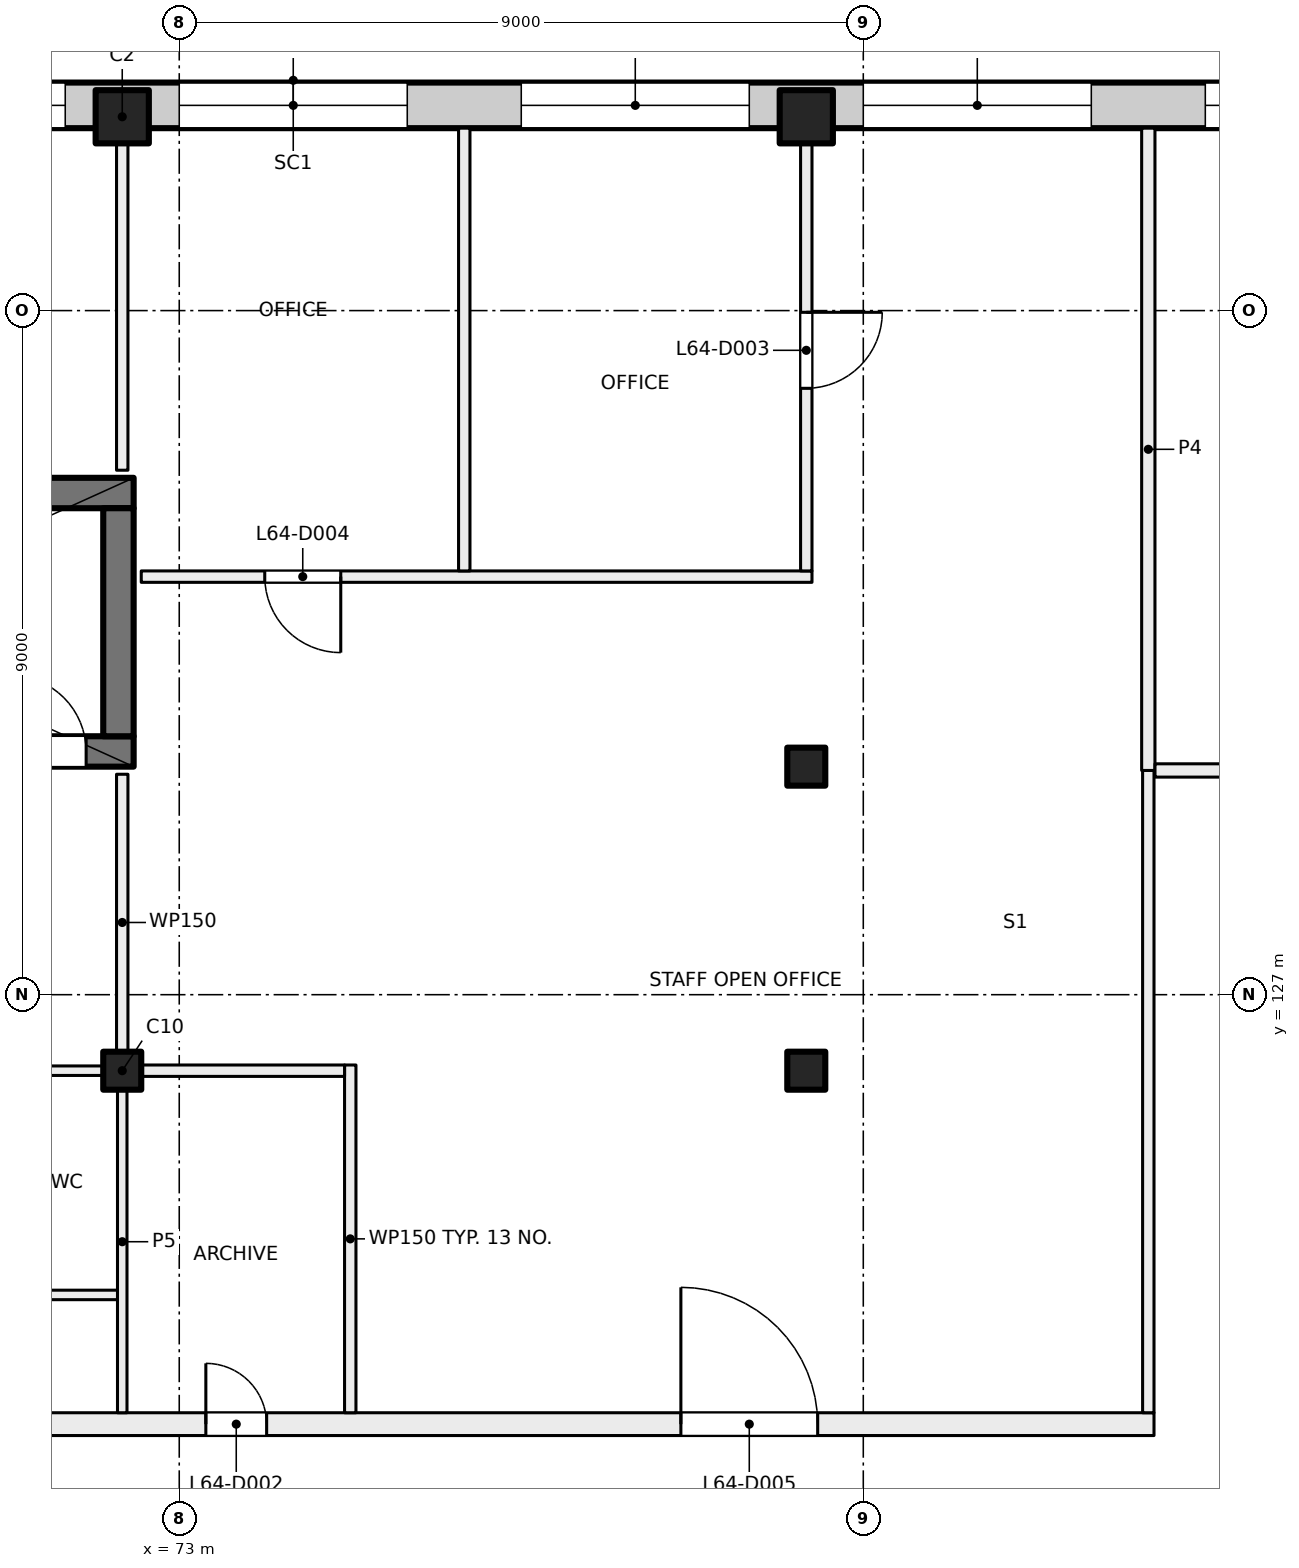
"""IFC4 building model, lengths in metres.
Left out: names, types, materials, properties, quantities, classifications, styles, units other than length and angle.
Written with IfcOpenShell. Run it as: python <this file> out.ifc"""

import sys

from ifc_helpers import new_model, si_unit, direction, frame, frame_2d, origin, origin_2d, place, context, subcontext, project, spatial, rectangle, extrude, element, fill, save


model = new_model("IFC4")
c1 = context("Model", 3, precision=1e-05, world=origin(), true_north=direction((0.0, 1.0)))
c2 = subcontext(c1, "Body", "Model", "MODEL_VIEW")
j1 = project(units=[si_unit("LENGTHUNIT", "METRE"), si_unit("PLANEANGLEUNIT", "RADIAN")], contexts=[c1])
p1 = place(None, origin())
s1 = spatial("IfcSite", under=j1, at=p1, CompositionType="ELEMENT")
p2 = place(p1, origin())
s2 = spatial("IfcBuilding", under=s1, at=p2, CompositionType="ELEMENT")
p3 = place(p2, frame((0.0, 0.0, 269.5)))
s3 = spatial("IfcBuildingStorey", under=s2, at=p3, CompositionType="ELEMENT", Elevation=269.5)
for number, where, z_axis, x_axis in (
    (1, (81.25, 130.0, 0.0), (0.0, 0.0, 1.0), (1.0, 0.0, 0.0)),
    (2, (72.25, 126.0, 0.0), (0.0, 0.0, 1.0), (1.0, 0.0, 0.0)),
    (3, (81.25, 126.0, 0.0), (0.0, 0.0, 1.0), (1.0, 0.0, 0.0)),
):
    element("IfcColumn", number, at=place(p3, frame(where, z_axis=z_axis, x_axis=x_axis)), inside=s3, PredefinedType="COLUMN", context=c2, shape_type="SweptSolid", body=[
        extrude(rectangle(XDim=0.5, YDim=0.5, at=origin_2d()), origin(), (0.0, 0.0, 1.0), 4.0),
    ])
for number, where, z_axis, x_axis in (
    (4, (72.25, 138.55, 0.0), (0.0, 0.0, 1.0), (1.0, 0.0, 0.0)),
    (5, (81.25, 138.55, 0.0), (0.0, 0.0, 1.0), (1.0, 0.0, 0.0)),
):
    element("IfcColumn", number, at=place(p3, frame(where, z_axis=z_axis, x_axis=x_axis)), inside=s3, PredefinedType="COLUMN", context=c2, shape_type="SweptSolid", body=[
        extrude(rectangle(XDim=0.7, YDim=0.7, at=origin_2d()), origin(), (0.0, 0.0, 1.0), 4.0),
    ])
p4 = place(p3, frame((63.5, 130.2, 0.0), z_axis=(0.0, 0.0, 1.0), x_axis=(1.0, 0.0, 0.0)))
e6 = element("IfcWall", 6, at=p4, inside=s3, PredefinedType="SHEAR", context=c2, shape_type="SweptSolid", body=[
    extrude(rectangle(XDim=8.9, YDim=0.4, at=frame_2d((4.45, 0.0))), origin(), (0.0, 0.0, 1.0), 4.0),
])
p5 = place(p4, frame((7.275, 0.0, 0.0)))
e7 = element("IfcOpeningElement", 7, at=p5, cuts=e6, PredefinedType="OPENING", context=c2, shape_type="SweptSolid", body=[
    extrude(rectangle(XDim=1.0, YDim=2.1, at=frame_2d((0.5, 1.05))), frame((0.0, 0.21, 0.0), z_axis=(0.0, -1.0, 0.0), x_axis=(1.0, 0.0, 0.0)), (0.0, 0.0, 1.0), 0.42),
])
p6 = place(p3, frame((64.0, 133.6, 0.0), z_axis=(0.0, 0.0, 1.0), x_axis=(1.0, 0.0, 0.0)))
e8 = element("IfcWall", 8, at=p6, inside=s3, PredefinedType="SHEAR", context=c2, shape_type="SweptSolid", body=[
    extrude(rectangle(XDim=8.4, YDim=0.4, at=frame_2d((4.2, 0.0))), origin(), (0.0, 0.0, 1.0), 4.0),
])
p7 = place(p3, frame((72.2, 130.4, 0.0), z_axis=(0.0, 0.0, 1.0), x_axis=(0.0, 1.0, 0.0)))
e9 = element("IfcWall", 9, at=p7, inside=s3, PredefinedType="SHEAR", context=c2, shape_type="SweptSolid", body=[
    extrude(rectangle(XDim=3.0, YDim=0.4, at=frame_2d((1.5, 0.0))), origin(), (0.0, 0.0, 1.0), 4.0),
])
p8 = place(p3, frame((47.07, 138.7, 0.0), z_axis=(0.0, 0.0, 1.0), x_axis=(1.0, 0.0, 0.0)))
e10 = element("IfcWall", 10, at=p8, inside=s3, PredefinedType="SOLIDWALL", context=c2, shape_type="SweptSolid", body=[
    extrude(rectangle(XDim=43.91, YDim=0.6, at=frame_2d((21.955, 0.0))), origin(), (0.0, 0.0, 1.0), 3.625),
])
p9 = place(p8, frame((3.43, 0.0, 0.9)))
e11 = element("IfcOpeningElement", 11, at=p9, cuts=e10, PredefinedType="OPENING", context=c2, shape_type="SweptSolid", body=[
    extrude(rectangle(XDim=3.0, YDim=2.4, at=frame_2d((1.5, 1.2))), frame((0.0, 0.31, 0.0), z_axis=(0.0, -1.0, 0.0), x_axis=(1.0, 0.0, 0.0)), (0.0, 0.0, 1.0), 0.62),
])
p10 = place(p8, frame((7.93, 0.0, 0.9)))
e12 = element("IfcOpeningElement", 12, at=p10, cuts=e10, PredefinedType="OPENING", context=c2, shape_type="SweptSolid", body=[
    extrude(rectangle(XDim=3.0, YDim=2.4, at=frame_2d((1.5, 1.2))), frame((0.0, 0.31, 0.0), z_axis=(0.0, -1.0, 0.0), x_axis=(1.0, 0.0, 0.0)), (0.0, 0.0, 1.0), 0.62),
])
p11 = place(p8, frame((12.43, 0.0, 0.9)))
e13 = element("IfcOpeningElement", 13, at=p11, cuts=e10, PredefinedType="OPENING", context=c2, shape_type="SweptSolid", body=[
    extrude(rectangle(XDim=3.0, YDim=2.4, at=frame_2d((1.5, 1.2))), frame((0.0, 0.31, 0.0), z_axis=(0.0, -1.0, 0.0), x_axis=(1.0, 0.0, 0.0)), (0.0, 0.0, 1.0), 0.62),
])
p12 = place(p8, frame((16.93, 0.0, 0.9)))
e14 = element("IfcOpeningElement", 14, at=p12, cuts=e10, PredefinedType="OPENING", context=c2, shape_type="SweptSolid", body=[
    extrude(rectangle(XDim=3.0, YDim=2.4, at=frame_2d((1.5, 1.2))), frame((0.0, 0.31, 0.0), z_axis=(0.0, -1.0, 0.0), x_axis=(1.0, 0.0, 0.0)), (0.0, 0.0, 1.0), 0.62),
])
p13 = place(p8, frame((21.43, 0.0, 0.9)))
e15 = element("IfcOpeningElement", 15, at=p13, cuts=e10, PredefinedType="OPENING", context=c2, shape_type="SweptSolid", body=[
    extrude(rectangle(XDim=3.0, YDim=2.4, at=frame_2d((1.5, 1.2))), frame((0.0, 0.31, 0.0), z_axis=(0.0, -1.0, 0.0), x_axis=(1.0, 0.0, 0.0)), (0.0, 0.0, 1.0), 0.62),
])
p14 = place(p8, frame((25.93, 0.0, 0.9)))
e16 = element("IfcOpeningElement", 16, at=p14, cuts=e10, PredefinedType="OPENING", context=c2, shape_type="SweptSolid", body=[
    extrude(rectangle(XDim=3.0, YDim=2.4, at=frame_2d((1.5, 1.2))), frame((0.0, 0.31, 0.0), z_axis=(0.0, -1.0, 0.0), x_axis=(1.0, 0.0, 0.0)), (0.0, 0.0, 1.0), 0.62),
])
p15 = place(p8, frame((30.43, 0.0, 0.9)))
e17 = element("IfcOpeningElement", 17, at=p15, cuts=e10, PredefinedType="OPENING", context=c2, shape_type="SweptSolid", body=[
    extrude(rectangle(XDim=3.0, YDim=2.4, at=frame_2d((1.5, 1.2))), frame((0.0, 0.31, 0.0), z_axis=(0.0, -1.0, 0.0), x_axis=(1.0, 0.0, 0.0)), (0.0, 0.0, 1.0), 0.62),
])
p16 = place(p8, frame((34.93, 0.0, 0.9)))
e18 = element("IfcOpeningElement", 18, at=p16, cuts=e10, PredefinedType="OPENING", context=c2, shape_type="SweptSolid", body=[
    extrude(rectangle(XDim=3.0, YDim=2.4, at=frame_2d((1.5, 1.2))), frame((0.0, 0.31, 0.0), z_axis=(0.0, -1.0, 0.0), x_axis=(1.0, 0.0, 0.0)), (0.0, 0.0, 1.0), 0.62),
])
p17 = place(p8, frame((39.43, 0.0, 0.9)))
e19 = element("IfcOpeningElement", 19, at=p17, cuts=e10, PredefinedType="OPENING", context=c2, shape_type="SweptSolid", body=[
    extrude(rectangle(XDim=3.0, YDim=2.4, at=frame_2d((1.5, 1.2))), frame((0.0, 0.31, 0.0), z_axis=(0.0, -1.0, 0.0), x_axis=(1.0, 0.0, 0.0)), (0.0, 0.0, 1.0), 0.62),
])
p18 = place(p3, frame((54.4, 121.35, 0.0), z_axis=(0.0, 0.0, 1.0), x_axis=(1.0, 0.0, 0.0)))
e20 = element("IfcWall", 20, at=p18, inside=s3, PredefinedType="PARTITIONING", context=c2, shape_type="SweptSolid", body=[
    extrude(rectangle(XDim=31.425, YDim=0.3, at=frame_2d((15.712, 0.0))), origin(), (0.0, 0.0, 1.0), 3.625),
])
p19 = place(p18, frame((18.95, 0.0, 0.0)))
e21 = element("IfcOpeningElement", 21, at=p19, cuts=e20, PredefinedType="OPENING", context=c2, shape_type="SweptSolid", body=[
    extrude(rectangle(XDim=0.8, YDim=2.1, at=frame_2d((0.4, 1.05))), frame((0.0, 0.16, 0.0), z_axis=(0.0, -1.0, 0.0), x_axis=(1.0, 0.0, 0.0)), (0.0, 0.0, 1.0), 0.32),
])
p20 = place(p18, frame((25.2, 0.0, 0.0)))
e22 = element("IfcOpeningElement", 22, at=p20, cuts=e20, PredefinedType="OPENING", context=c2, shape_type="SweptSolid", body=[
    extrude(rectangle(XDim=1.8, YDim=2.1, at=frame_2d((0.9, 1.05))), frame((0.0, 0.16, 0.0), z_axis=(0.0, -1.0, 0.0), x_axis=(1.0, 0.0, 0.0)), (0.0, 0.0, 1.0), 0.32),
])
p21 = place(p18, frame((12.85, 0.0, 0.0)))
e23 = element("IfcOpeningElement", 23, at=p21, cuts=e20, PredefinedType="OPENING", context=c2, shape_type="SweptSolid", body=[
    extrude(rectangle(XDim=1.0, YDim=2.1, at=frame_2d((0.5, 1.05))), frame((0.0, 0.16, 0.0), z_axis=(0.0, -1.0, 0.0), x_axis=(1.0, 0.0, 0.0)), (0.0, 0.0, 1.0), 0.32),
])
p22 = place(p18, frame((3.515, 0.0, 0.0)))
e24 = element("IfcOpeningElement", 24, at=p22, cuts=e20, PredefinedType="OPENING", context=c2, shape_type="SweptSolid", body=[
    extrude(rectangle(XDim=1.8, YDim=2.1, at=frame_2d((0.9, 1.05))), frame((0.0, 0.16, 0.0), z_axis=(0.0, -1.0, 0.0), x_axis=(1.0, 0.0, 0.0)), (0.0, 0.0, 1.0), 0.32),
])
p23 = place(p3, frame((63.312, 123.05, 0.0), z_axis=(0.0, 0.0, 1.0), x_axis=(1.0, 0.0, 0.0)))
e25 = element("IfcWall", 25, at=p23, inside=s3, PredefinedType="PARTITIONING", context=c2, shape_type="SweptSolid", body=[
    extrude(rectangle(XDim=8.876, YDim=0.125, at=frame_2d((4.438, 0.0))), origin(), (0.0, 0.0, 1.0), 3.625),
])
p24 = place(p23, frame((6.817, 0.0, 0.0)))
e26 = element("IfcOpeningElement", 26, at=p24, cuts=e25, PredefinedType="OPENING", context=c2, shape_type="SweptSolid", body=[
    extrude(rectangle(XDim=0.8, YDim=2.1, at=frame_2d((0.4, 1.05))), frame((0.0, 0.073, 0.0), z_axis=(0.0, -1.0, 0.0), x_axis=(1.0, 0.0, 0.0)), (0.0, 0.0, 1.0), 0.145),
])
p25 = place(p23, frame((3.638, 0.0, 0.0)))
e27 = element("IfcOpeningElement", 27, at=p25, cuts=e25, PredefinedType="OPENING", context=c2, shape_type="SweptSolid", body=[
    extrude(rectangle(XDim=0.8, YDim=2.1, at=frame_2d((0.4, 1.05))), frame((0.0, 0.073, 0.0), z_axis=(0.0, -1.0, 0.0), x_axis=(1.0, 0.0, 0.0)), (0.0, 0.0, 1.0), 0.145),
])
p26 = place(p23, frame((0.759, 0.0, 0.0)))
e28 = element("IfcOpeningElement", 28, at=p26, cuts=e25, PredefinedType="OPENING", context=c2, shape_type="SweptSolid", body=[
    extrude(rectangle(XDim=1.0, YDim=2.1, at=frame_2d((0.5, 1.05))), frame((0.0, 0.073, 0.0), z_axis=(0.0, -1.0, 0.0), x_axis=(1.0, 0.0, 0.0)), (0.0, 0.0, 1.0), 0.145),
])
p27 = place(p3, frame((63.188, 126.0, 0.0), z_axis=(0.0, 0.0, 1.0), x_axis=(1.0, 0.0, 0.0)))
e29 = element("IfcWall", 29, at=p27, inside=s3, PredefinedType="PARTITIONING", context=c2, shape_type="SweptSolid", body=[
    extrude(rectangle(XDim=9.062, YDim=0.125, at=frame_2d((4.531, 0.0))), origin(), (0.0, 0.0, 1.0), 3.625),
])
p28 = place(p3, frame((72.25, 126.0, 0.0), z_axis=(0.0, 0.0, 1.0), x_axis=(0.0, -1.0, 0.0)))
e30 = element("IfcWall", 30, at=p28, inside=s3, PredefinedType="PARTITIONING", context=c2, shape_type="SweptSolid", body=[
    extrude(rectangle(XDim=4.5, YDim=0.125, at=frame_2d((2.25, 0.0))), origin(), (0.0, 0.0, 1.0), 3.625),
])
p29 = place(p3, frame((72.25, 126.0, 0.0), z_axis=(0.0, 0.0, 1.0), x_axis=(0.0, 1.0, 0.0)))
e31 = element("IfcWall", 31, at=p29, inside=s3, PredefinedType="PARTITIONING", context=c2, shape_type="SweptSolid", body=[
    extrude(rectangle(XDim=3.9, YDim=0.15, at=frame_2d((1.95, 0.0))), origin(), (0.0, 0.0, 1.0), 3.625),
])
p30 = place(p3, frame((72.25, 133.9, 0.0), z_axis=(0.0, 0.0, 1.0), x_axis=(0.0, 1.0, 0.0)))
e32 = element("IfcWall", 32, at=p30, inside=s3, PredefinedType="PARTITIONING", context=c2, shape_type="SweptSolid", body=[
    extrude(rectangle(XDim=4.5, YDim=0.15, at=frame_2d((2.25, 0.0))), origin(), (0.0, 0.0, 1.0), 3.625),
])
p31 = place(p3, frame((81.325, 132.5, 0.0), z_axis=(0.0, 0.0, 1.0), x_axis=(-1.0, 0.0, 0.0)))
e33 = element("IfcWall", 33, at=p31, inside=s3, PredefinedType="PARTITIONING", context=c2, shape_type="SweptSolid", body=[
    extrude(rectangle(XDim=8.825, YDim=0.15, at=frame_2d((4.413, 0.0))), origin(), (0.0, 0.0, 1.0), 3.625),
])
p32 = place(p31, frame((6.2, 0.0, 0.0)))
e34 = element("IfcOpeningElement", 34, at=p32, cuts=e33, PredefinedType="OPENING", context=c2, shape_type="SweptSolid", body=[
    extrude(rectangle(XDim=1.0, YDim=2.1, at=frame_2d((0.5, 1.05))), frame((0.0, 0.085, 0.0), z_axis=(0.0, -1.0, 0.0), x_axis=(1.0, 0.0, 0.0)), (0.0, 0.0, 1.0), 0.17),
])
p33 = place(p3, frame((75.25, 121.5, 0.0), z_axis=(0.0, 0.0, 1.0), x_axis=(0.0, 1.0, 0.0)))
e35 = element("IfcWall", 35, at=p33, inside=s3, PredefinedType="PARTITIONING", context=c2, shape_type="SweptSolid", body=[
    extrude(rectangle(XDim=4.575, YDim=0.15, at=frame_2d((2.288, 0.0))), origin(), (0.0, 0.0, 1.0), 3.625),
])
p34 = place(p3, frame((75.175, 126.0, 0.0), z_axis=(0.0, 0.0, 1.0), x_axis=(-1.0, 0.0, 0.0)))
e36 = element("IfcWall", 36, at=p34, inside=s3, PredefinedType="PARTITIONING", context=c2, shape_type="SweptSolid", body=[
    extrude(rectangle(XDim=2.925, YDim=0.15, at=frame_2d((1.462, 0.0))), origin(), (0.0, 0.0, 1.0), 3.625),
])
p35 = place(p3, frame((76.75, 132.575, 0.0), z_axis=(0.0, 0.0, 1.0), x_axis=(0.0, 1.0, 0.0)))
e37 = element("IfcWall", 37, at=p35, inside=s3, PredefinedType="PARTITIONING", context=c2, shape_type="SweptSolid", body=[
    extrude(rectangle(XDim=5.825, YDim=0.15, at=frame_2d((2.913, 0.0))), origin(), (0.0, 0.0, 1.0), 3.625),
])
p36 = place(p3, frame((81.25, 138.4, 0.0), z_axis=(0.0, 0.0, 1.0), x_axis=(0.0, -1.0, 0.0)))
e38 = element("IfcWall", 38, at=p36, inside=s3, PredefinedType="PARTITIONING", context=c2, shape_type="SweptSolid", body=[
    extrude(rectangle(XDim=5.825, YDim=0.15, at=frame_2d((2.913, 0.0))), origin(), (0.0, 0.0, 1.0), 3.625),
])
p37 = place(p36, frame((2.423, 0.0, 0.0)))
e39 = element("IfcOpeningElement", 39, at=p37, cuts=e38, PredefinedType="OPENING", context=c2, shape_type="SweptSolid", body=[
    extrude(rectangle(XDim=1.0, YDim=2.1, at=frame_2d((0.5, 1.05))), frame((0.0, 0.085, 0.0), z_axis=(0.0, -1.0, 0.0), x_axis=(1.0, 0.0, 0.0)), (0.0, 0.0, 1.0), 0.17),
])
p38 = place(p3, frame((85.75, 121.5, 0.0), z_axis=(0.0, 0.0, 1.0), x_axis=(0.0, 1.0, 0.0)))
e40 = element("IfcWall", 40, at=p38, inside=s3, PredefinedType="PARTITIONING", context=c2, shape_type="SweptSolid", body=[
    extrude(rectangle(XDim=8.45, YDim=0.15, at=frame_2d((4.225, 0.0))), origin(), (0.0, 0.0, 1.0), 3.625),
])
p39 = place(p3, frame((85.75, 129.95, 0.0), z_axis=(0.0, 0.0, 1.0), x_axis=(0.0, 1.0, 0.0)))
e41 = element("IfcWall", 41, at=p39, inside=s3, PredefinedType="PARTITIONING", context=c2, shape_type="SweptSolid", body=[
    extrude(rectangle(XDim=8.45, YDim=0.175, at=frame_2d((4.225, 0.0))), origin(), (0.0, 0.0, 1.0), 3.625),
])
p40 = place(p3, frame((85.838, 129.95, 0.0), z_axis=(0.0, 0.0, 1.0), x_axis=(1.0, 0.0, 0.0)))
e42 = element("IfcWall", 42, at=p40, inside=s3, PredefinedType="PARTITIONING", context=c2, shape_type="SweptSolid", body=[
    extrude(rectangle(XDim=5.162, YDim=0.175, at=frame_2d((2.581, 0.0))), origin(), (0.0, 0.0, 1.0), 3.625),
])
p41 = place(p40, frame((1.971, 0.0, 0.0)))
e43 = element("IfcOpeningElement", 43, at=p41, cuts=e42, PredefinedType="OPENING", context=c2, shape_type="SweptSolid", body=[
    extrude(rectangle(XDim=1.2, YDim=2.1, at=frame_2d((0.6, 1.05))), frame((0.0, 0.097, 0.0), z_axis=(0.0, -1.0, 0.0), x_axis=(1.0, 0.0, 0.0)), (0.0, 0.0, 1.0), 0.195),
])
p42 = place(p13, origin())
e44 = element("IfcWindow", 44, at=p42, inside=s3, PartitioningType="SINGLE_PANEL", PredefinedType="WINDOW", context=c2, shape_type="SweptSolid", body=[
    extrude(rectangle(XDim=3.0, YDim=2.4, at=frame_2d((1.5, 1.2))), frame((0.0, 0.03, 0.0), z_axis=(0.0, -1.0, 0.0), x_axis=(1.0, 0.0, 0.0)), (0.0, 0.0, 1.0), 0.06),
])
fill(e15, e44)
p43 = place(p14, origin())
e45 = element("IfcWindow", 45, at=p43, inside=s3, PartitioningType="SINGLE_PANEL", PredefinedType="WINDOW", context=c2, shape_type="SweptSolid", body=[
    extrude(rectangle(XDim=3.0, YDim=2.4, at=frame_2d((1.5, 1.2))), frame((0.0, 0.03, 0.0), z_axis=(0.0, -1.0, 0.0), x_axis=(1.0, 0.0, 0.0)), (0.0, 0.0, 1.0), 0.06),
])
fill(e16, e45)
p44 = place(p15, origin())
e46 = element("IfcWindow", 46, at=p44, inside=s3, PartitioningType="SINGLE_PANEL", PredefinedType="WINDOW", context=c2, shape_type="SweptSolid", body=[
    extrude(rectangle(XDim=3.0, YDim=2.4, at=frame_2d((1.5, 1.2))), frame((0.0, 0.03, 0.0), z_axis=(0.0, -1.0, 0.0), x_axis=(1.0, 0.0, 0.0)), (0.0, 0.0, 1.0), 0.06),
])
fill(e17, e46)
p45 = place(p16, origin())
e47 = element("IfcWindow", 47, at=p45, inside=s3, PartitioningType="SINGLE_PANEL", PredefinedType="WINDOW", context=c2, shape_type="SweptSolid", body=[
    extrude(rectangle(XDim=3.0, YDim=2.4, at=frame_2d((1.5, 1.2))), frame((0.0, 0.03, 0.0), z_axis=(0.0, -1.0, 0.0), x_axis=(1.0, 0.0, 0.0)), (0.0, 0.0, 1.0), 0.06),
])
fill(e18, e47)
p46 = place(p17, origin())
e48 = element("IfcWindow", 48, at=p46, inside=s3, PartitioningType="SINGLE_PANEL", PredefinedType="WINDOW", context=c2, shape_type="SweptSolid", body=[
    extrude(rectangle(XDim=3.0, YDim=2.4, at=frame_2d((1.5, 1.2))), frame((0.0, 0.03, 0.0), z_axis=(0.0, -1.0, 0.0), x_axis=(1.0, 0.0, 0.0)), (0.0, 0.0, 1.0), 0.06),
])
fill(e19, e48)
p47 = place(p5, origin())
e49 = element("IfcDoor", 49, at=p47, inside=s3, OperationType="SINGLE_SWING_LEFT", PredefinedType="DOOR", context=c2, shape_type="SweptSolid", body=[
    extrude(rectangle(XDim=1.0, YDim=2.1, at=frame_2d((0.5, 1.05))), frame((0.0, 0.025, 0.0), z_axis=(0.0, -1.0, 0.0), x_axis=(1.0, 0.0, 0.0)), (0.0, 0.0, 1.0), 0.05),
])
fill(e7, e49)
p48 = place(p19, origin())
e50 = element("IfcDoor", 50, at=p48, inside=s3, OperationType="SINGLE_SWING_LEFT", PredefinedType="DOOR", context=c2, shape_type="SweptSolid", body=[
    extrude(rectangle(XDim=0.8, YDim=2.1, at=frame_2d((0.4, 1.05))), frame((0.0, 0.025, 0.0), z_axis=(0.0, -1.0, 0.0), x_axis=(1.0, 0.0, 0.0)), (0.0, 0.0, 1.0), 0.05),
])
fill(e21, e50)
p49 = place(p37, origin())
e51 = element("IfcDoor", 51, at=p49, inside=s3, OperationType="SINGLE_SWING_LEFT", PredefinedType="DOOR", context=c2, shape_type="SweptSolid", body=[
    extrude(rectangle(XDim=1.0, YDim=2.1, at=frame_2d((0.5, 1.05))), frame((0.0, 0.025, 0.0), z_axis=(0.0, -1.0, 0.0), x_axis=(1.0, 0.0, 0.0)), (0.0, 0.0, 1.0), 0.05),
])
fill(e39, e51)
p50 = place(p32, origin())
e52 = element("IfcDoor", 52, at=p50, inside=s3, OperationType="SINGLE_SWING_RIGHT", PredefinedType="DOOR", context=c2, shape_type="SweptSolid", body=[
    extrude(rectangle(XDim=1.0, YDim=2.1, at=frame_2d((0.5, 1.05))), frame((0.0, 0.025, 0.0), z_axis=(0.0, -1.0, 0.0), x_axis=(1.0, 0.0, 0.0)), (0.0, 0.0, 1.0), 0.05),
])
fill(e34, e52)
p51 = place(p20, origin())
e53 = element("IfcDoor", 53, at=p51, inside=s3, OperationType="DOUBLE_DOOR_SINGLE_SWING", PredefinedType="DOOR", context=c2, shape_type="SweptSolid", body=[
    extrude(rectangle(XDim=1.8, YDim=2.1, at=frame_2d((0.9, 1.05))), frame((0.0, 0.025, 0.0), z_axis=(0.0, -1.0, 0.0), x_axis=(1.0, 0.0, 0.0)), (0.0, 0.0, 1.0), 0.05),
])
fill(e22, e53)
save(model, sys.argv[1])
